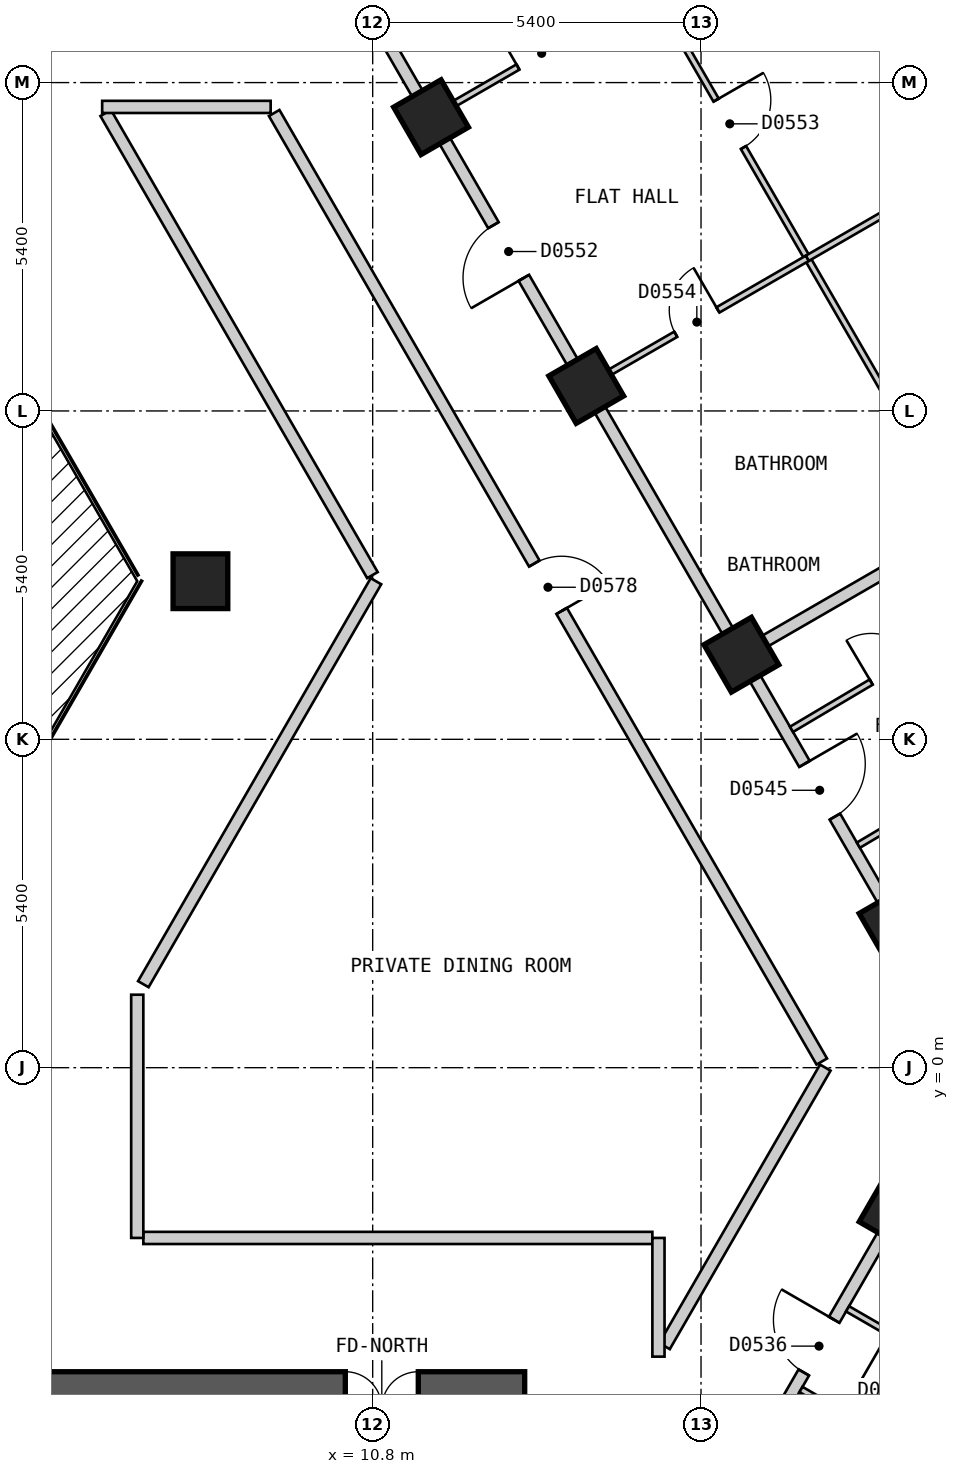
"""IFC4 building model, lengths in metres.
Left out: names, types, materials, properties, quantities, classifications, styles, units other than length and angle.
Written with IfcOpenShell. Run it as: python <this file> out.ifc"""

import sys

from ifc_helpers import new_model, si_unit, direction, frame, frame_2d, origin, origin_2d, place, context, subcontext, project, spatial, polyline, rectangle, outline, extrude, element, fill, save


model = new_model("IFC4")
c1 = context("Model", 3, precision=1e-05, world=origin(), true_north=direction((0.0, 1.0)))
c2 = subcontext(c1, "Body", "Model", "MODEL_VIEW")
j1 = project(units=[si_unit("LENGTHUNIT", "METRE"), si_unit("PLANEANGLEUNIT", "RADIAN")], contexts=[c1])
p1 = place(None, origin())
s1 = spatial("IfcSite", under=j1, at=p1, CompositionType="ELEMENT")
p2 = place(p1, origin())
s2 = spatial("IfcBuilding", under=s1, at=p2, CompositionType="ELEMENT")
p3 = place(p2, frame((0.0, 0.0, 44.4)))
s3 = spatial("IfcBuildingStorey", under=s2, at=p3, CompositionType="ELEMENT", Elevation=44.4)
for number, where, z_axis, x_axis in (
    (1, (19.417, -2.369, 0.0), (0.0, 0.0, 1.0), (0.5, 0.866, 0.0)),
    (2, (19.416, 2.371, 0.0), (0.0, 0.0, 1.0), (-0.5, 0.866, 0.0)),
    (3, (16.864, 6.791, 0.0), (0.0, 0.0, 1.0), (-0.5, 0.866, 0.0)),
    (4, (14.312, 11.211, 0.0), (0.0, 0.0, 1.0), (-0.5, 0.866, 0.0)),
    (5, (7.967, 8.0, 0.0), (0.0, 0.0, 1.0), (1.0, 0.0, 0.0)),
    (6, (11.76, 15.631, 0.0), (0.0, 0.0, 1.0), (-0.5, 0.866, 0.0)),
):
    element("IfcColumn", number, at=place(p3, frame(where, z_axis=z_axis, x_axis=x_axis)), inside=s3, PredefinedType="COLUMN", context=c2, shape_type="SweptSolid", body=[
        extrude(rectangle(XDim=0.9, YDim=0.9, at=origin_2d()), origin(), (0.0, 0.0, 1.0), 3.0),
    ])
p4 = place(p3, frame((-13.3, -5.6, 0.0), z_axis=(0.0, 0.0, 1.0), x_axis=(1.0, 0.0, 0.0)))
e7 = element("IfcWall", 7, at=p4, inside=s3, PredefinedType="SHEAR", context=c2, shape_type="SweptSolid", body=[
    extrude(rectangle(XDim=26.6, YDim=1.2, at=frame_2d((13.3, 0.0))), origin(), (0.0, 0.0, 1.0), 2.7),
])
p5 = place(p4, frame((23.65, 0.0, 0.0)))
e8 = element("IfcOpeningElement", 8, at=p5, cuts=e7, PredefinedType="OPENING", context=c2, shape_type="SweptSolid", body=[
    extrude(rectangle(XDim=1.2, YDim=2.1, at=frame_2d((0.6, 1.05))), frame((0.0, 0.61, 0.0), z_axis=(0.0, -1.0, 0.0), x_axis=(1.0, 0.0, 0.0)), (0.0, 0.0, 1.0), 1.22),
])
p6 = place(p3, frame((17.71, -25.825, 0.0), z_axis=(0.0, 0.0, 1.0), x_axis=(0.500001938803, 0.866024284413, 0.0)))
e9 = element("IfcWall", 9, at=p6, inside=s3, PredefinedType="SOLIDWALL", context=c2, shape_type="SweptSolid", body=[
    extrude(outline(polyline([(0.0, -0.15), (27.02, -0.15), (26.94, 0.15), (0.08, 0.15), (0.0, -0.15)])), origin(), (0.0, 0.0, 1.0), 2.7),
])
p7 = place(p6, frame((2.553, 0.0, 0.15)))
e10 = element("IfcOpeningElement", 10, at=p7, cuts=e9, PredefinedType="OPENING", context=c2, shape_type="SweptSolid", body=[
    extrude(rectangle(XDim=1.5, YDim=2.1, at=frame_2d((0.75, 1.05))), frame((0.0, 0.16, 0.0), z_axis=(0.0, -1.0, 0.0), x_axis=(1.0, 0.0, 0.0)), (0.0, 0.0, 1.0), 0.32),
])
p8 = place(p6, frame((7.658, 0.0, 0.15)))
e11 = element("IfcOpeningElement", 11, at=p8, cuts=e9, PredefinedType="OPENING", context=c2, shape_type="SweptSolid", body=[
    extrude(rectangle(XDim=1.5, YDim=2.1, at=frame_2d((0.75, 1.05))), frame((0.0, 0.16, 0.0), z_axis=(0.0, -1.0, 0.0), x_axis=(1.0, 0.0, 0.0)), (0.0, 0.0, 1.0), 0.32),
])
p9 = place(p6, frame((12.761, 0.0, 0.15)))
e12 = element("IfcOpeningElement", 12, at=p9, cuts=e9, PredefinedType="OPENING", context=c2, shape_type="SweptSolid", body=[
    extrude(rectangle(XDim=1.5, YDim=2.1, at=frame_2d((0.75, 1.05))), frame((0.0, 0.16, 0.0), z_axis=(0.0, -1.0, 0.0), x_axis=(1.0, 0.0, 0.0)), (0.0, 0.0, 1.0), 0.32),
])
p10 = place(p6, frame((17.865, 0.0, 0.15)))
e13 = element("IfcOpeningElement", 13, at=p10, cuts=e9, PredefinedType="OPENING", context=c2, shape_type="SweptSolid", body=[
    extrude(rectangle(XDim=1.5, YDim=2.1, at=frame_2d((0.75, 1.05))), frame((0.0, 0.16, 0.0), z_axis=(0.0, -1.0, 0.0), x_axis=(1.0, 0.0, 0.0)), (0.0, 0.0, 1.0), 0.32),
])
p11 = place(p6, frame((22.969, 0.0, 0.15)))
e14 = element("IfcOpeningElement", 14, at=p11, cuts=e9, PredefinedType="OPENING", context=c2, shape_type="SweptSolid", body=[
    extrude(rectangle(XDim=1.5, YDim=2.1, at=frame_2d((0.75, 1.05))), frame((0.0, 0.16, 0.0), z_axis=(0.0, -1.0, 0.0), x_axis=(1.0, 0.0, 0.0)), (0.0, 0.0, 1.0), 0.32),
])
p12 = place(p3, frame((31.22, 2.425, 0.0), z_axis=(0.0, 0.0, 1.0), x_axis=(-0.500001938803, 0.866024284413, 0.0)))
e15 = element("IfcWall", 15, at=p12, inside=s3, PredefinedType="SOLIDWALL", context=c2, shape_type="SweptSolid", body=[
    extrude(outline(polyline([(0.0, -0.15), (27.02, -0.15), (26.94, 0.15), (0.08, 0.15), (0.0, -0.15)])), origin(), (0.0, 0.0, 1.0), 2.7),
])
p13 = place(p12, frame((2.553, 0.0, 0.15)))
e16 = element("IfcOpeningElement", 16, at=p13, cuts=e15, PredefinedType="OPENING", context=c2, shape_type="SweptSolid", body=[
    extrude(rectangle(XDim=1.5, YDim=2.1, at=frame_2d((0.75, 1.05))), frame((0.0, 0.16, 0.0), z_axis=(0.0, -1.0, 0.0), x_axis=(1.0, 0.0, 0.0)), (0.0, 0.0, 1.0), 0.32),
])
p14 = place(p12, frame((7.657, 0.0, 0.15)))
e17 = element("IfcOpeningElement", 17, at=p14, cuts=e15, PredefinedType="OPENING", context=c2, shape_type="SweptSolid", body=[
    extrude(rectangle(XDim=1.5, YDim=2.1, at=frame_2d((0.75, 1.05))), frame((0.0, 0.16, 0.0), z_axis=(0.0, -1.0, 0.0), x_axis=(1.0, 0.0, 0.0)), (0.0, 0.0, 1.0), 0.32),
])
p15 = place(p12, frame((12.761, 0.0, 0.15)))
e18 = element("IfcOpeningElement", 18, at=p15, cuts=e15, PredefinedType="OPENING", context=c2, shape_type="SweptSolid", body=[
    extrude(rectangle(XDim=1.5, YDim=2.1, at=frame_2d((0.75, 1.05))), frame((0.0, 0.16, 0.0), z_axis=(0.0, -1.0, 0.0), x_axis=(1.0, 0.0, 0.0)), (0.0, 0.0, 1.0), 0.32),
])
p16 = place(p12, frame((17.865, 0.0, 0.15)))
e19 = element("IfcOpeningElement", 19, at=p16, cuts=e15, PredefinedType="OPENING", context=c2, shape_type="SweptSolid", body=[
    extrude(rectangle(XDim=1.5, YDim=2.1, at=frame_2d((0.75, 1.05))), frame((0.0, 0.16, 0.0), z_axis=(0.0, -1.0, 0.0), x_axis=(1.0, 0.0, 0.0)), (0.0, 0.0, 1.0), 0.32),
])
p17 = place(p12, frame((22.969, 0.0, 0.15)))
e20 = element("IfcOpeningElement", 20, at=p17, cuts=e15, PredefinedType="OPENING", context=c2, shape_type="SweptSolid", body=[
    extrude(rectangle(XDim=1.5, YDim=2.1, at=frame_2d((0.75, 1.05))), frame((0.0, 0.16, 0.0), z_axis=(0.0, -1.0, 0.0), x_axis=(1.0, 0.0, 0.0)), (0.0, 0.0, 1.0), 0.32),
])
p18 = place(p3, frame((6.409, 15.7, 0.0), z_axis=(0.0, 0.0, 1.0), x_axis=(0.499930377127, -0.866065596838, 0.0)))
e21 = element("IfcWall", 21, at=p18, inside=s3, PredefinedType="PARTITIONING", context=c2, shape_type="SweptSolid", body=[
    extrude(rectangle(XDim=8.775, YDim=0.2, at=frame_2d((4.388, 0.0))), origin(), (0.0, 0.0, 1.0), 2.7),
])
p19 = place(p3, frame((9.18, 15.7, 0.0), z_axis=(0.0, 0.0, 1.0), x_axis=(0.500003652032, -0.866023295272, 0.0)))
e22 = element("IfcWall", 22, at=p19, inside=s3, PredefinedType="PARTITIONING", context=c2, shape_type="SweptSolid", body=[
    extrude(rectangle(XDim=18.012, YDim=0.2, at=frame_2d((9.006, 0.0))), origin(), (0.0, 0.0, 1.0), 2.7),
])
p20 = place(p19, frame((8.556, 0.0, 0.0)))
e23 = element("IfcOpeningElement", 23, at=p20, cuts=e22, PredefinedType="OPENING", context=c2, shape_type="SweptSolid", body=[
    extrude(rectangle(XDim=0.9, YDim=2.1, at=frame_2d((0.45, 1.05))), frame((0.0, 0.11, 0.0), z_axis=(0.0, -1.0, 0.0), x_axis=(1.0, 0.0, 0.0)), (0.0, 0.0, 1.0), 0.22),
])
p21 = place(p3, frame((10.45, 17.9, 0.0), z_axis=(0.0, 0.0, 1.0), x_axis=(0.500034352617, -0.866005569383, 0.0)))
e24 = element("IfcWall", 24, at=p21, inside=s3, PredefinedType="PARTITIONING", context=c2, shape_type="SweptSolid", body=[
    extrude(rectangle(XDim=20.553, YDim=0.2, at=frame_2d((10.276, 0.0))), origin(), (0.0, 0.0, 1.0), 2.7),
])
p22 = place(p21, frame((14.902, 0.0, 0.0)))
e25 = element("IfcOpeningElement", 25, at=p22, cuts=e24, PredefinedType="OPENING", context=c2, shape_type="SweptSolid", body=[
    extrude(rectangle(XDim=1.0, YDim=2.1, at=frame_2d((0.5, 1.05))), frame((0.0, 0.11, 0.0), z_axis=(0.0, -1.0, 0.0), x_axis=(1.0, 0.0, 0.0)), (0.0, 0.0, 1.0), 0.22),
])
p23 = place(p21, frame((4.671, 0.0, 0.0)))
e26 = element("IfcOpeningElement", 26, at=p23, cuts=e24, PredefinedType="OPENING", context=c2, shape_type="SweptSolid", body=[
    extrude(rectangle(XDim=1.0, YDim=2.1, at=frame_2d((0.5, 1.05))), frame((0.0, 0.11, 0.0), z_axis=(0.0, -1.0, 0.0), x_axis=(1.0, 0.0, 0.0)), (0.0, 0.0, 1.0), 0.22),
])
p24 = place(p3, frame((7.028, -2.8, 0.0), z_axis=(0.0, 0.0, 1.0), x_axis=(1.0, 0.0, 0.0)))
e27 = element("IfcWall", 27, at=p24, inside=s3, PredefinedType="PARTITIONING", context=c2, shape_type="SweptSolid", body=[
    extrude(rectangle(XDim=8.372, YDim=0.2, at=frame_2d((4.186, 0.0))), origin(), (0.0, 0.0, 1.0), 2.7),
])
p25 = place(p3, frame((6.351, 15.8, 0.0), z_axis=(0.0, 0.0, 1.0), x_axis=(1.0, 0.0, 0.0)))
e28 = element("IfcWall", 28, at=p25, inside=s3, PredefinedType="PARTITIONING", context=c2, shape_type="SweptSolid", body=[
    extrude(rectangle(XDim=2.771, YDim=0.2, at=frame_2d((1.385, 0.0))), origin(), (0.0, 0.0, 1.0), 2.7),
])
p26 = place(p3, frame((7.028, 1.373, 0.0), z_axis=(0.0, 0.0, 1.0), x_axis=(0.49998574534, 0.86603363356, 0.0)))
e29 = element("IfcWall", 29, at=p26, inside=s3, PredefinedType="PARTITIONING", context=c2, shape_type="SweptSolid", body=[
    extrude(rectangle(XDim=7.652, YDim=0.2, at=frame_2d((3.826, 0.0))), origin(), (0.0, 0.0, 1.0), 2.7),
])
p27 = place(p3, frame((15.6, -4.579, 0.0), z_axis=(0.0, 0.0, 1.0), x_axis=(0.499927597274, 0.866067201483, 0.0)))
e30 = element("IfcWall", 30, at=p27, inside=s3, PredefinedType="PARTITIONING", context=c2, shape_type="SweptSolid", body=[
    extrude(rectangle(XDim=5.288, YDim=0.2, at=frame_2d((2.644, 0.0))), origin(), (0.0, 0.0, 1.0), 2.7),
])
p28 = place(p3, frame((15.707, -8.794, 0.0), z_axis=(0.0, 0.0, 1.0), x_axis=(0.50000451406, 0.866022797575, 0.0)))
e31 = element("IfcWall", 31, at=p28, inside=s3, PredefinedType="PARTITIONING", context=c2, shape_type="SweptSolid", body=[
    extrude(rectangle(XDim=10.04, YDim=0.2, at=frame_2d((5.02, 0.0))), origin(), (0.0, 0.0, 1.0), 2.7),
])
p29 = place(p28, frame((4.367, 0.0, 0.0)))
e32 = element("IfcOpeningElement", 32, at=p29, cuts=e31, PredefinedType="OPENING", context=c2, shape_type="SweptSolid", body=[
    extrude(rectangle(XDim=1.0, YDim=2.1, at=frame_2d((0.5, 1.05))), frame((0.0, 0.11, 0.0), z_axis=(0.0, -1.0, 0.0), x_axis=(1.0, 0.0, 0.0)), (0.0, 0.0, 1.0), 0.22),
])
p30 = place(p28, frame((8.402, 0.0, 0.0)))
e33 = element("IfcOpeningElement", 33, at=p30, cuts=e31, PredefinedType="OPENING", context=c2, shape_type="SweptSolid", body=[
    extrude(rectangle(XDim=0.8, YDim=2.1, at=frame_2d((0.4, 1.05))), frame((0.0, 0.11, 0.0), z_axis=(0.0, -1.0, 0.0), x_axis=(1.0, 0.0, 0.0)), (0.0, 0.0, 1.0), 0.22),
])
p31 = place(p3, frame((6.928, -2.8, 0.0), z_axis=(0.0, 0.0, 1.0), x_axis=(0.0, 1.0, 0.0)))
e34 = element("IfcWall", 34, at=p31, inside=s3, PredefinedType="PARTITIONING", context=c2, shape_type="SweptSolid", body=[
    extrude(rectangle(XDim=4.0, YDim=0.2, at=frame_2d((2.0, 0.0))), origin(), (0.0, 0.0, 1.0), 2.7),
])
p32 = place(p3, frame((15.5, -4.752, 0.0), z_axis=(0.0, 0.0, 1.0), x_axis=(0.0, 1.0, 0.0)))
e35 = element("IfcWall", 35, at=p32, inside=s3, PredefinedType="PARTITIONING", context=c2, shape_type="SweptSolid", body=[
    extrude(rectangle(XDim=1.952, YDim=0.2, at=frame_2d((0.976, 0.0))), origin(), (0.0, 0.0, 1.0), 2.7),
])
p33 = place(p3, frame((12.875, 22.1, 0.0), z_axis=(0.0, 0.0, 1.0), x_axis=(0.499994897061, -0.866028349948, 0.0)))
e36 = element("IfcWall", 36, at=p33, inside=s3, PredefinedType="PARTITIONING", context=c2, shape_type="SweptSolid", body=[
    extrude(rectangle(XDim=15.152, YDim=0.1, at=frame_2d((7.576, 0.0))), origin(), (0.0, 0.0, 1.0), 2.7),
])
p34 = place(p33, frame((7.146, 0.0, 0.0)))
e37 = element("IfcOpeningElement", 37, at=p34, cuts=e36, PredefinedType="OPENING", context=c2, shape_type="SweptSolid", body=[
    extrude(rectangle(XDim=0.9, YDim=2.1, at=frame_2d((0.45, 1.05))), frame((0.0, 0.06, 0.0), z_axis=(0.0, -1.0, 0.0), x_axis=(1.0, 0.0, 0.0)), (0.0, 0.0, 1.0), 0.12),
])
p35 = place(p3, frame((17.844, -5.292, 0.0), z_axis=(0.0, 0.0, 1.0), x_axis=(0.866038211682, -0.499977815414, 0.0)))
e38 = element("IfcWall", 38, at=p35, inside=s3, PredefinedType="PARTITIONING", context=c2, shape_type="SweptSolid", body=[
    extrude(rectangle(XDim=2.51, YDim=0.1, at=frame_2d((1.255, 0.0))), origin(), (0.0, 0.0, 1.0), 2.7),
])
p36 = place(p35, frame((0.83, 0.0, 0.0)))
e39 = element("IfcOpeningElement", 39, at=p36, cuts=e38, PredefinedType="OPENING", context=c2, shape_type="SweptSolid", body=[
    extrude(rectangle(XDim=0.8, YDim=2.1, at=frame_2d((0.4, 1.05))), frame((0.0, 0.06, 0.0), z_axis=(0.0, -1.0, 0.0), x_axis=(1.0, 0.0, 0.0)), (0.0, 0.0, 1.0), 0.12),
])
p37 = place(p3, frame((18.61, -3.966, 0.0), z_axis=(0.0, 0.0, 1.0), x_axis=(0.865958718457, -0.500115484592, 0.0)))
e40 = element("IfcWall", 40, at=p37, inside=s3, PredefinedType="PARTITIONING", context=c2, shape_type="SweptSolid", body=[
    extrude(rectangle(XDim=2.509, YDim=0.1, at=frame_2d((1.255, 0.0))), origin(), (0.0, 0.0, 1.0), 2.7),
])
p38 = place(p37, frame((0.78, 0.0, 0.0)))
e41 = element("IfcOpeningElement", 41, at=p38, cuts=e40, PredefinedType="OPENING", context=c2, shape_type="SweptSolid", body=[
    extrude(rectangle(XDim=0.9, YDim=2.1, at=frame_2d((0.45, 1.05))), frame((0.0, 0.06, 0.0), z_axis=(0.0, -1.0, 0.0), x_axis=(1.0, 0.0, 0.0)), (0.0, 0.0, 1.0), 0.12),
])
p39 = place(p3, frame((11.847, 15.681, 0.0), z_axis=(0.0, 0.0, 1.0), x_axis=(0.865980278416, 0.500078151287, 0.0)))
e42 = element("IfcWall", 42, at=p39, inside=s3, PredefinedType="PARTITIONING", context=c2, shape_type="SweptSolid", body=[
    extrude(rectangle(XDim=4.099, YDim=0.1, at=frame_2d((2.05, 0.0))), origin(), (0.0, 0.0, 1.0), 2.7),
])
p40 = place(p39, frame((1.55, 0.0, 0.0)))
e43 = element("IfcOpeningElement", 43, at=p40, cuts=e42, PredefinedType="OPENING", context=c2, shape_type="SweptSolid", body=[
    extrude(rectangle(XDim=0.9, YDim=2.1, at=frame_2d((0.45, 1.05))), frame((0.0, 0.06, 0.0), z_axis=(0.0, -1.0, 0.0), x_axis=(1.0, 0.0, 0.0)), (0.0, 0.0, 1.0), 0.12),
])
p41 = place(p3, frame((14.399, 11.261, 0.0), z_axis=(0.0, 0.0, 1.0), x_axis=(0.865980278416, 0.500078151287, 0.0)))
e44 = element("IfcWall", 44, at=p41, inside=s3, PredefinedType="PARTITIONING", context=c2, shape_type="SweptSolid", body=[
    extrude(rectangle(XDim=4.099, YDim=0.1, at=frame_2d((2.05, 0.0))), origin(), (0.0, 0.0, 1.0), 2.7),
])
p42 = place(p41, frame((1.6, 0.0, 0.0)))
e45 = element("IfcOpeningElement", 45, at=p42, cuts=e44, PredefinedType="OPENING", context=c2, shape_type="SweptSolid", body=[
    extrude(rectangle(XDim=0.8, YDim=2.1, at=frame_2d((0.4, 1.05))), frame((0.0, 0.06, 0.0), z_axis=(0.0, -1.0, 0.0), x_axis=(1.0, 0.0, 0.0)), (0.0, 0.0, 1.0), 0.12),
])
p43 = place(p3, frame((17.688, 5.564, 0.0), z_axis=(0.0, 0.0, 1.0), x_axis=(0.860107296662, 0.510113162179, 0.0)))
e46 = element("IfcWall", 46, at=p43, inside=s3, PredefinedType="PARTITIONING", context=c2, shape_type="SweptSolid", body=[
    extrude(rectangle(XDim=3.897, YDim=0.1, at=frame_2d((1.949, 0.0))), origin(), (0.0, 0.0, 1.0), 2.7),
])
p44 = place(p43, frame((1.524, 0.0, 0.0)))
e47 = element("IfcOpeningElement", 47, at=p44, cuts=e46, PredefinedType="OPENING", context=c2, shape_type="SweptSolid", body=[
    extrude(rectangle(XDim=0.8, YDim=2.1, at=frame_2d((0.4, 1.05))), frame((0.0, 0.06, 0.0), z_axis=(0.0, -1.0, 0.0), x_axis=(1.0, 0.0, 0.0)), (0.0, 0.0, 1.0), 0.12),
])
p45 = place(p3, frame((18.788, 3.659, 0.0), z_axis=(0.0, 0.0, 1.0), x_axis=(0.860090994311, 0.510140648749, 0.0)))
e48 = element("IfcWall", 48, at=p45, inside=s3, PredefinedType="PARTITIONING", context=c2, shape_type="SweptSolid", body=[
    extrude(rectangle(XDim=3.897, YDim=0.1, at=frame_2d((1.948, 0.0))), origin(), (0.0, 0.0, 1.0), 2.7),
])
p46 = place(p45, frame((1.474, 0.0, 0.0)))
e49 = element("IfcOpeningElement", 49, at=p46, cuts=e48, PredefinedType="OPENING", context=c2, shape_type="SweptSolid", body=[
    extrude(rectangle(XDim=0.9, YDim=2.1, at=frame_2d((0.45, 1.05))), frame((0.0, 0.06, 0.0), z_axis=(0.0, -1.0, 0.0), x_axis=(1.0, 0.0, 0.0)), (0.0, 0.0, 1.0), 0.12),
])
p47 = place(p3, frame((16.95, 6.841, 0.0), z_axis=(0.0, 0.0, 1.0), x_axis=(0.866031112038, 0.499990112884, 0.0)))
e50 = element("IfcWall", 50, at=p47, inside=s3, PredefinedType="PARTITIONING", context=c2, shape_type="SweptSolid", body=[
    extrude(rectangle(XDim=3.948, YDim=0.2, at=frame_2d((1.974, 0.0))), origin(), (0.0, 0.0, 1.0), 2.7),
])
p48 = place(p3, frame((17.949, 13.311, 0.0), z_axis=(0.0, 0.0, 1.0), x_axis=(0.866052608538, 0.499952877023, 0.0)))
e51 = element("IfcWall", 51, at=p48, inside=s3, PredefinedType="PARTITIONING", context=c2, shape_type="SweptSolid", body=[
    extrude(rectangle(XDim=5.9, YDim=0.1, at=frame_2d((2.95, 0.0))), origin(), (0.0, 0.0, 1.0), 2.7),
])
p49 = place(p48, frame((2.5, 0.0, 0.0)))
e52 = element("IfcOpeningElement", 52, at=p49, cuts=e51, PredefinedType="OPENING", context=c2, shape_type="SweptSolid", body=[
    extrude(rectangle(XDim=0.9, YDim=2.1, at=frame_2d((0.45, 1.05))), frame((0.0, 0.06, 0.0), z_axis=(0.0, -1.0, 0.0), x_axis=(1.0, 0.0, 0.0)), (0.0, 0.0, 1.0), 0.12),
])
p50 = place(p29, origin())
e53 = element("IfcDoor", 53, at=p50, inside=s3, OperationType="SINGLE_SWING_RIGHT", PredefinedType="DOOR", context=c2, shape_type="SweptSolid", body=[
    extrude(rectangle(XDim=1.0, YDim=2.1, at=frame_2d((0.5, 1.05))), frame((0.0, 0.025, 0.0), z_axis=(0.0, -1.0, 0.0), x_axis=(1.0, 0.0, 0.0)), (0.0, 0.0, 1.0), 0.05),
])
fill(e32, e53)
p51 = place(p22, origin())
e54 = element("IfcDoor", 54, at=p51, inside=s3, OperationType="SINGLE_SWING_LEFT", PredefinedType="DOOR", context=c2, shape_type="SweptSolid", body=[
    extrude(rectangle(XDim=1.0, YDim=2.1, at=frame_2d((0.5, 1.05))), frame((0.0, 0.025, 0.0), z_axis=(0.0, -1.0, 0.0), x_axis=(1.0, 0.0, 0.0)), (0.0, 0.0, 1.0), 0.05),
])
fill(e25, e54)
p52 = place(p44, origin())
e55 = element("IfcDoor", 55, at=p52, inside=s3, OperationType="SINGLE_SWING_LEFT", PredefinedType="DOOR", context=c2, shape_type="SweptSolid", body=[
    extrude(rectangle(XDim=0.8, YDim=2.1, at=frame_2d((0.4, 1.05))), frame((0.0, 0.025, 0.0), z_axis=(0.0, -1.0, 0.0), x_axis=(1.0, 0.0, 0.0)), (0.0, 0.0, 1.0), 0.05),
])
fill(e47, e55)
p53 = place(p23, origin())
e56 = element("IfcDoor", 56, at=p53, inside=s3, OperationType="SINGLE_SWING_RIGHT", PredefinedType="DOOR", context=c2, shape_type="SweptSolid", body=[
    extrude(rectangle(XDim=1.0, YDim=2.1, at=frame_2d((0.5, 1.05))), frame((0.0, 0.025, 0.0), z_axis=(0.0, -1.0, 0.0), x_axis=(1.0, 0.0, 0.0)), (0.0, 0.0, 1.0), 0.05),
])
fill(e26, e56)
p54 = place(p34, origin())
e57 = element("IfcDoor", 57, at=p54, inside=s3, OperationType="SINGLE_SWING_LEFT", PredefinedType="DOOR", context=c2, shape_type="SweptSolid", body=[
    extrude(rectangle(XDim=0.9, YDim=2.1, at=frame_2d((0.45, 1.05))), frame((0.0, 0.025, 0.0), z_axis=(0.0, -1.0, 0.0), x_axis=(1.0, 0.0, 0.0)), (0.0, 0.0, 1.0), 0.05),
])
fill(e37, e57)
p55 = place(p42, origin())
e58 = element("IfcDoor", 58, at=p55, inside=s3, OperationType="SINGLE_SWING_RIGHT", PredefinedType="DOOR", context=c2, shape_type="SweptSolid", body=[
    extrude(rectangle(XDim=0.8, YDim=2.1, at=frame_2d((0.4, 1.05))), frame((0.0, 0.025, 0.0), z_axis=(0.0, -1.0, 0.0), x_axis=(1.0, 0.0, 0.0)), (0.0, 0.0, 1.0), 0.05),
])
fill(e45, e58)
p56 = place(p40, origin())
e59 = element("IfcDoor", 59, at=p56, inside=s3, OperationType="SINGLE_SWING_LEFT", PredefinedType="DOOR", context=c2, shape_type="SweptSolid", body=[
    extrude(rectangle(XDim=0.9, YDim=2.1, at=frame_2d((0.45, 1.05))), frame((0.0, 0.025, 0.0), z_axis=(0.0, -1.0, 0.0), x_axis=(1.0, 0.0, 0.0)), (0.0, 0.0, 1.0), 0.05),
])
fill(e43, e59)
p57 = place(p20, origin())
e60 = element("IfcDoor", 60, at=p57, inside=s3, OperationType="SINGLE_SWING_RIGHT", PredefinedType="DOOR", context=c2, shape_type="SweptSolid", body=[
    extrude(rectangle(XDim=0.9, YDim=2.1, at=frame_2d((0.45, 1.05))), frame((0.0, 0.025, 0.0), z_axis=(0.0, -1.0, 0.0), x_axis=(1.0, 0.0, 0.0)), (0.0, 0.0, 1.0), 0.05),
])
fill(e23, e60)
save(model, sys.argv[1])
